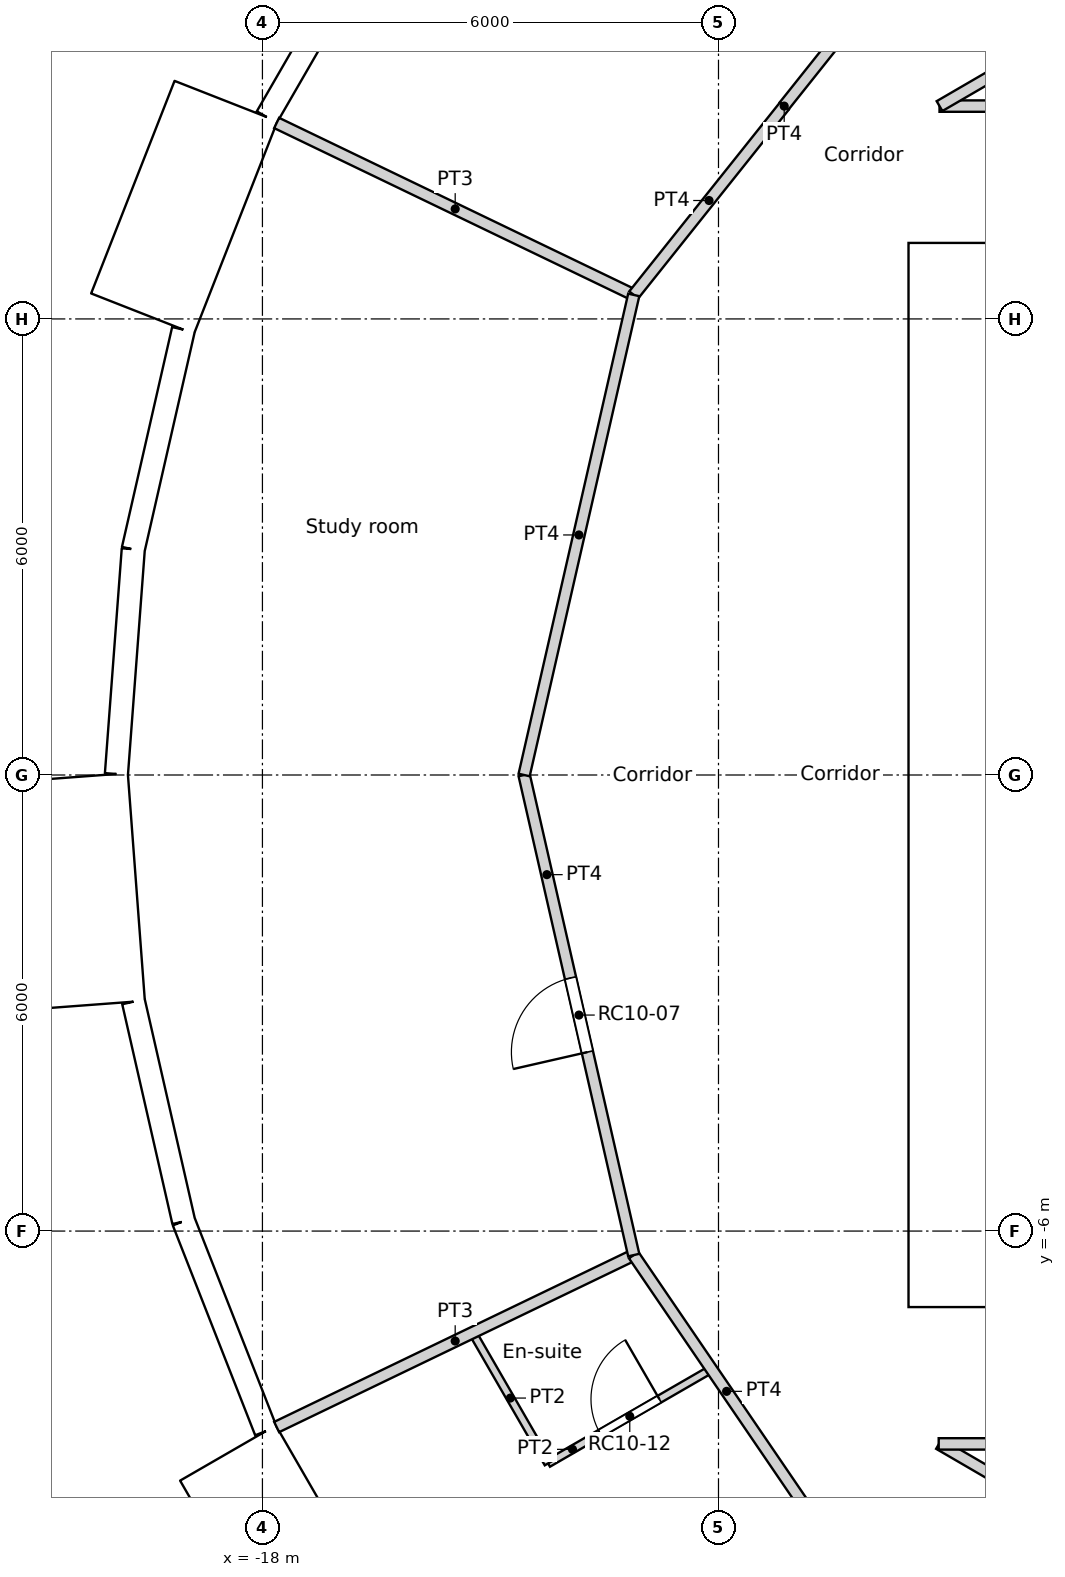
"""IFC4 building model, lengths in metres.
Left out: names, types, materials, properties, quantities, classifications, styles, units other than length and angle.
Written with IfcOpenShell. Run it as: python <this file> out.ifc"""

import sys

from ifc_helpers import new_model, si_unit, direction, frame, frame_2d, origin, origin_2d, place, context, subcontext, project, spatial, rectangle, circle, extrude, element, fill, save


model = new_model("IFC4")
c1 = context("Model", 3, precision=1e-05, world=origin(), true_north=direction((0.0, 1.0)))
c2 = subcontext(c1, "Body", "Model", "MODEL_VIEW")
j1 = project(units=[si_unit("LENGTHUNIT", "METRE"), si_unit("PLANEANGLEUNIT", "RADIAN")], contexts=[c1])
p1 = place(None, origin())
s1 = spatial("IfcSite", under=j1, at=p1, CompositionType="ELEMENT")
p2 = place(p1, origin())
s2 = spatial("IfcBuilding", under=s1, at=p2, CompositionType="ELEMENT")
p3 = place(p2, frame((0.0, 0.0, 323.4)))
s3 = spatial("IfcBuildingStorey", under=s2, at=p3, CompositionType="ELEMENT", Elevation=323.4)
for number, where, z_axis, x_axis in (
    (1, (-16.958, 8.167, 0.0), (0.0, 0.0, 1.0), (1.0, 0.0, 0.0)),
    (2, (-18.612, 2.805, 0.0), (0.0, 0.0, 1.0), (1.0, 0.0, 0.0)),
    (3, (-18.612, -2.805, 0.0), (0.0, 0.0, 1.0), (1.0, 0.0, 0.0)),
    (4, (-16.958, -8.167, 0.0), (0.0, 0.0, 1.0), (1.0, 0.0, 0.0)),
):
    element("IfcColumn", number, at=place(p3, frame(where, z_axis=z_axis, x_axis=x_axis)), inside=s3, PredefinedType="COLUMN", context=c2, shape_type="SweptSolid", body=[
        extrude(circle(Radius=0.45, at=origin_2d()), origin(), (0.0, 0.0, 1.0), 3.6),
    ])
p4 = place(p3, frame((-16.46, 11.222, 0.0), z_axis=(0.0, 0.0, 1.0), x_axis=(-0.499950756475, -0.86605383268, 0.0)))
e5 = element("IfcWall", 5, at=p4, inside=s3, PredefinedType="SOLIDWALL", context=c2, shape_type="SweptSolid", body=[
    extrude(rectangle(XDim=2.962, YDim=0.3, at=frame_2d((1.481, 0.0))), origin(), (0.0, 0.0, 1.0), 3.25),
])
p5 = place(p4, frame((1.481, 0.0, 1.55)))
e6 = element("IfcOpeningElement", 6, at=p5, cuts=e5, PredefinedType="OPENING", context=c2, shape_type="SweptSolid", body=[
    extrude(circle(Radius=0.9, at=origin_2d()), frame((0.0, 0.16, 0.0), z_axis=(0.0, -1.0, 0.0), x_axis=(1.0, 0.0, 0.0)), (0.0, 0.0, 1.0), 0.32),
])
p6 = place(p3, frame((-18.48, 8.864, -0.35), z_axis=(0.0, 0.0, 1.0), x_axis=(-0.36537792632, -0.93085926485, 0.0)))
e7 = element("IfcWall", 7, at=p6, inside=s3, PredefinedType="ELEMENTEDWALL", context=c2, shape_type="SweptSolid", body=[
    extrude(rectangle(XDim=3.0, YDim=1.45, at=frame_2d((1.5, 0.0))), origin(), (0.0, 0.0, 1.0), 3.6),
])
p7 = place(p6, frame((1.5, 0.0, 1.9)))
e8 = element("IfcOpeningElement", 8, at=p7, cuts=e7, PredefinedType="OPENING", context=c2, shape_type="SweptSolid", body=[
    extrude(circle(Radius=0.9, at=origin_2d()), frame((0.0, 0.735, 0.0), z_axis=(0.0, -1.0, 0.0), x_axis=(1.0, 0.0, 0.0)), (0.0, 0.0, 1.0), 1.47),
])
p8 = place(p3, frame((-19.04, 5.857, 0.0), z_axis=(0.0, 0.0, 1.0), x_axis=(-0.222529389789, -0.974925982155, 0.0)))
e9 = element("IfcWall", 9, at=p8, inside=s3, PredefinedType="SOLIDWALL", context=c2, shape_type="SweptSolid", body=[
    extrude(rectangle(XDim=2.962, YDim=0.3, at=frame_2d((1.481, 0.0))), origin(), (0.0, 0.0, 1.0), 3.25),
])
p9 = place(p8, frame((1.481, 0.0, 1.55)))
e10 = element("IfcOpeningElement", 10, at=p9, cuts=e9, PredefinedType="OPENING", context=c2, shape_type="SweptSolid", body=[
    extrude(circle(Radius=0.9, at=origin_2d()), frame((0.0, 0.16, 0.0), z_axis=(0.0, -1.0, 0.0), x_axis=(1.0, 0.0, 0.0)), (0.0, 0.0, 1.0), 0.32),
])
p10 = place(p3, frame((-19.699, 2.969, 0.0), z_axis=(0.0, 0.0, 1.0), x_axis=(-0.07474897196, -0.997202382263, 0.0)))
e11 = element("IfcWall", 11, at=p10, inside=s3, PredefinedType="SOLIDWALL", context=c2, shape_type="SweptSolid", body=[
    extrude(rectangle(XDim=2.962, YDim=0.3, at=frame_2d((1.481, 0.0))), origin(), (0.0, 0.0, 1.0), 3.25),
])
p11 = place(p10, frame((1.481, 0.0, 1.55)))
e12 = element("IfcOpeningElement", 12, at=p11, cuts=e11, PredefinedType="OPENING", context=c2, shape_type="SweptSolid", body=[
    extrude(circle(Radius=0.9, at=origin_2d()), frame((0.0, 0.16, 0.0), z_axis=(0.0, -1.0, 0.0), x_axis=(1.0, 0.0, 0.0)), (0.0, 0.0, 1.0), 0.32),
])
p12 = place(p3, frame((-20.496, -0.032, -0.35), z_axis=(0.0, 0.0, 1.0), x_axis=(0.074785902127, -0.997199613339, 0.0)))
e13 = element("IfcWall", 13, at=p12, inside=s3, PredefinedType="ELEMENTEDWALL", context=c2, shape_type="SweptSolid", body=[
    extrude(rectangle(XDim=3.0, YDim=1.45, at=frame_2d((1.5, 0.0))), origin(), (0.0, 0.0, 1.0), 3.6),
])
p13 = place(p12, frame((1.5, 0.0, 1.9)))
e14 = element("IfcOpeningElement", 14, at=p13, cuts=e13, PredefinedType="OPENING", context=c2, shape_type="SweptSolid", body=[
    extrude(circle(Radius=0.9, at=origin_2d()), frame((0.0, 0.735, 0.0), z_axis=(0.0, -1.0, 0.0), x_axis=(1.0, 0.0, 0.0)), (0.0, 0.0, 1.0), 1.47),
])
p14 = place(p3, frame((-19.696, -2.984, 0.0), z_axis=(0.0, 0.0, 1.0), x_axis=(0.222529389789, -0.974925982155, 0.0)))
e15 = element("IfcWall", 15, at=p14, inside=s3, PredefinedType="SOLIDWALL", context=c2, shape_type="SweptSolid", body=[
    extrude(rectangle(XDim=2.962, YDim=0.3, at=frame_2d((1.481, 0.0))), origin(), (0.0, 0.0, 1.0), 3.25),
])
p15 = place(p14, frame((1.481, 0.0, 1.55)))
e16 = element("IfcOpeningElement", 16, at=p15, cuts=e15, PredefinedType="OPENING", context=c2, shape_type="SweptSolid", body=[
    extrude(circle(Radius=0.9, at=origin_2d()), frame((0.0, 0.16, 0.0), z_axis=(0.0, -1.0, 0.0), x_axis=(1.0, 0.0, 0.0)), (0.0, 0.0, 1.0), 0.32),
])
p16 = place(p3, frame((-19.037, -5.872, 0.0), z_axis=(0.0, 0.0, 1.0), x_axis=(0.36530043032, -0.930889679612, 0.0)))
e17 = element("IfcWall", 17, at=p16, inside=s3, PredefinedType="SOLIDWALL", context=c2, shape_type="SweptSolid", body=[
    extrude(rectangle(XDim=2.962, YDim=0.3, at=frame_2d((1.481, 0.0))), origin(), (0.0, 0.0, 1.0), 3.25),
])
p17 = place(p16, frame((1.481, 0.0, 1.55)))
e18 = element("IfcOpeningElement", 18, at=p17, cuts=e17, PredefinedType="OPENING", context=c2, shape_type="SweptSolid", body=[
    extrude(circle(Radius=0.9, at=origin_2d()), frame((0.0, 0.16, 0.0), z_axis=(0.0, -1.0, 0.0), x_axis=(1.0, 0.0, 0.0)), (0.0, 0.0, 1.0), 0.32),
])
p18 = place(p3, frame((-18.452, -8.921, -0.35), z_axis=(0.0, 0.0, 1.0), x_axis=(0.499990139034, -0.866031096941, 0.0)))
e19 = element("IfcWall", 19, at=p18, inside=s3, PredefinedType="ELEMENTEDWALL", context=c2, shape_type="SweptSolid", body=[
    extrude(rectangle(XDim=3.0, YDim=1.45, at=frame_2d((1.5, 0.0))), origin(), (0.0, 0.0, 1.0), 3.6),
])
p19 = place(p18, frame((1.5, 0.0, 1.9)))
e20 = element("IfcOpeningElement", 20, at=p19, cuts=e19, PredefinedType="OPENING", context=c2, shape_type="SweptSolid", body=[
    extrude(circle(Radius=0.9, at=origin_2d()), frame((0.0, 0.735, 0.0), z_axis=(0.0, -1.0, 0.0), x_axis=(1.0, 0.0, 0.0)), (0.0, 0.0, 1.0), 1.47),
])
p20 = place(p3, frame((-9.5, -6.7, 0.0), z_axis=(0.0, 0.0, 1.0), x_axis=(1.0, 0.0, 0.0)))
e21 = element("IfcWall", 21, at=p20, inside=s3, PredefinedType="SOLIDWALL", context=c2, shape_type="SweptSolid", body=[
    extrude(rectangle(XDim=19.0, YDim=0.6, at=frame_2d((9.5, 0.0))), origin(), (0.0, 0.0, 1.0), 3.6),
])
p21 = place(p20, frame((10.4, 0.0, 0.0)))
e22 = element("IfcOpeningElement", 22, at=p21, cuts=e21, PredefinedType="OPENING", context=c2, shape_type="SweptSolid", body=[
    extrude(rectangle(XDim=1.0, YDim=2.1, at=frame_2d((0.5, 1.05))), frame((0.0, 0.3, 0.0), z_axis=(0.0, -1.0, 0.0), x_axis=(1.0, 0.0, 0.0)), (0.0, 0.0, 1.0), 0.6),
])
p22 = place(p20, frame((5.35, 0.0, 0.0)))
e23 = element("IfcOpeningElement", 23, at=p22, cuts=e21, PredefinedType="OPENING", context=c2, shape_type="SweptSolid", body=[
    extrude(rectangle(XDim=1.7, YDim=2.1, at=frame_2d((0.85, 1.05))), frame((0.0, 0.3, 0.0), z_axis=(0.0, -1.0, 0.0), x_axis=(1.0, 0.0, 0.0)), (0.0, 0.0, 1.0), 0.6),
])
p23 = place(p20, frame((11.95, 0.0, 0.0)))
e24 = element("IfcOpeningElement", 24, at=p23, cuts=e21, PredefinedType="OPENING", context=c2, shape_type="SweptSolid", body=[
    extrude(rectangle(XDim=1.7, YDim=2.1, at=frame_2d((0.85, 1.05))), frame((0.0, 0.3, 0.0), z_axis=(0.0, -1.0, 0.0), x_axis=(1.0, 0.0, 0.0)), (0.0, 0.0, 1.0), 0.6),
])
p24 = place(p3, frame((-9.5, 6.7, 0.0), z_axis=(0.0, 0.0, 1.0), x_axis=(1.0, 0.0, 0.0)))
e25 = element("IfcWall", 25, at=p24, inside=s3, PredefinedType="SOLIDWALL", context=c2, shape_type="SweptSolid", body=[
    extrude(rectangle(XDim=19.0, YDim=0.6, at=frame_2d((9.5, 0.0))), origin(), (0.0, 0.0, 1.0), 3.6),
])
p25 = place(p24, frame((5.35, 0.0, 0.0)))
e26 = element("IfcOpeningElement", 26, at=p25, cuts=e25, PredefinedType="OPENING", context=c2, shape_type="SweptSolid", body=[
    extrude(rectangle(XDim=1.7, YDim=2.1, at=frame_2d((0.85, 1.05))), frame((0.0, 0.3, 0.0), z_axis=(0.0, -1.0, 0.0), x_axis=(1.0, 0.0, 0.0)), (0.0, 0.0, 1.0), 0.6),
])
p26 = place(p3, frame((-9.2, -6.4, 0.0), z_axis=(0.0, 0.0, 1.0), x_axis=(0.0, 1.0, 0.0)))
e27 = element("IfcWall", 27, at=p26, inside=s3, PredefinedType="SOLIDWALL", context=c2, shape_type="SweptSolid", body=[
    extrude(rectangle(XDim=12.8, YDim=0.6, at=frame_2d((6.4, 0.0))), origin(), (0.0, 0.0, 1.0), 3.6),
])
p27 = place(p3, frame((-8.9, -3.1, 0.0), z_axis=(0.0, 0.0, 1.0), x_axis=(1.0, 0.0, 0.0)))
e28 = element("IfcWall", 28, at=p27, inside=s3, PredefinedType="SOLIDWALL", context=c2, shape_type="SweptSolid", body=[
    extrude(rectangle(XDim=9.6, YDim=0.3, at=frame_2d((4.8, 0.0))), origin(), (0.0, 0.0, 1.0), 3.25),
])
p28 = place(p27, frame((4.75, 0.0, 0.0)))
e29 = element("IfcOpeningElement", 29, at=p28, cuts=e28, PredefinedType="OPENING", context=c2, shape_type="SweptSolid", body=[
    extrude(rectangle(XDim=1.7, YDim=2.1, at=frame_2d((0.85, 1.05))), frame((0.0, 0.15, 0.0), z_axis=(0.0, -1.0, 0.0), x_axis=(1.0, 0.0, 0.0)), (0.0, 0.0, 1.0), 0.3),
])
p29 = place(p3, frame((-8.9, 3.1, 0.0), z_axis=(0.0, 0.0, 1.0), x_axis=(1.0, 0.0, 0.0)))
e30 = element("IfcWall", 30, at=p29, inside=s3, PredefinedType="SOLIDWALL", context=c2, shape_type="SweptSolid", body=[
    extrude(rectangle(XDim=4.55, YDim=0.3, at=frame_2d((2.275, 0.0))), origin(), (0.0, 0.0, 1.0), 3.25),
])
p30 = place(p3, frame((-8.9, 0.0, 0.0), z_axis=(0.0, 0.0, 1.0), x_axis=(1.0, 0.0, 0.0)))
e31 = element("IfcWall", 31, at=p30, inside=s3, PredefinedType="SOLIDWALL", context=c2, shape_type="SweptSolid", body=[
    extrude(rectangle(XDim=3.0, YDim=0.3, at=frame_2d((1.5, 0.0))), origin(), (0.0, 0.0, 1.0), 3.25),
])
p31 = place(p3, frame((-9.092, 8.8, 0.0), z_axis=(0.0, 0.0, 1.0), x_axis=(0.864470922103, 0.502682827277, 0.0)))
e32 = element("IfcWall", 32, at=p31, inside=s3, PredefinedType="PARTITIONING", context=c2, shape_type="SweptSolid", body=[
    extrude(rectangle(XDim=6.735, YDim=0.15, at=frame_2d((3.368, 0.0))), origin(), (0.0, 0.0, 1.0), 3.25),
])
p32 = place(p3, frame((-9.092, 8.8, 0.0), z_axis=(0.0, 0.0, 1.0), x_axis=(1.0, 0.0, 0.0)))
e33 = element("IfcWall", 33, at=p32, inside=s3, PredefinedType="PARTITIONING", context=c2, shape_type="SweptSolid", body=[
    extrude(rectangle(XDim=7.286, YDim=0.15, at=frame_2d((3.643, 0.0))), origin(), (0.0, 0.0, 1.0), 3.25),
])
p33 = place(p32, frame((3.143, 0.0, 0.0)))
e34 = element("IfcOpeningElement", 34, at=p33, cuts=e33, PredefinedType="OPENING", context=c2, shape_type="SweptSolid", body=[
    extrude(rectangle(XDim=1.0, YDim=2.04, at=frame_2d((0.5, 1.02))), frame((0.0, 0.075, 0.0), z_axis=(0.0, -1.0, 0.0), x_axis=(1.0, 0.0, 0.0)), (0.0, 0.0, 1.0), 0.15),
])
p34 = place(p3, frame((-11.134, 8.8, 0.0), z_axis=(0.0, 0.0, 1.0), x_axis=(-1.0, 0.0, 0.0)))
e35 = element("IfcWall", 35, at=p34, inside=s3, PredefinedType="PARTITIONING", context=c2, shape_type="SweptSolid", body=[
    extrude(rectangle(XDim=0.003, YDim=0.15, at=frame_2d((0.001, 0.0))), origin(), (0.0, 0.0, 1.0), 3.25),
])
p35 = place(p3, frame((-11.136, 8.802, 0.0), z_axis=(0.0, 0.0, 1.0), x_axis=(0.623151397235, 0.782101231379, 0.0)))
e36 = element("IfcWall", 36, at=p35, inside=s3, PredefinedType="PARTITIONING", context=c2, shape_type="SweptSolid", body=[
    extrude(rectangle(XDim=3.301, YDim=0.15, at=frame_2d((1.65, 0.0))), origin(), (0.0, 0.0, 1.0), 3.25),
])
p36 = place(p3, frame((-9.103, -8.8, 0.0), z_axis=(0.0, 0.0, 1.0), x_axis=(1.0, 0.0, 0.0)))
e37 = element("IfcWall", 37, at=p36, inside=s3, PredefinedType="PARTITIONING", context=c2, shape_type="SweptSolid", body=[
    extrude(rectangle(XDim=18.204, YDim=0.15, at=frame_2d((9.102, 0.0))), origin(), (0.0, 0.0, 1.0), 3.25),
])
p37 = place(p36, frame((8.597, 0.0, 0.0)))
e38 = element("IfcOpeningElement", 38, at=p37, cuts=e37, PredefinedType="OPENING", context=c2, shape_type="SweptSolid", body=[
    extrude(rectangle(XDim=1.0, YDim=2.04, at=frame_2d((0.5, 1.02))), frame((0.0, 0.075, 0.0), z_axis=(0.0, -1.0, 0.0), x_axis=(1.0, 0.0, 0.0)), (0.0, 0.0, 1.0), 0.15),
])
p38 = place(p3, frame((-9.099, -8.8, 0.0), z_axis=(0.0, 0.0, 1.0), x_axis=(0.864286794128, -0.502999341447, 0.0)))
e39 = element("IfcWall", 39, at=p38, inside=s3, PredefinedType="PARTITIONING", context=c2, shape_type="SweptSolid", body=[
    extrude(rectangle(XDim=6.741, YDim=0.15, at=frame_2d((3.371, 0.0))), origin(), (0.0, 0.0, 1.0), 3.25),
])
p39 = place(p3, frame((-13.115, 6.316, 0.0), z_axis=(0.0, 0.0, 1.0), x_axis=(0.623476099415, 0.781842409606, 0.0)))
e40 = element("IfcWall", 40, at=p39, inside=s3, PredefinedType="PARTITIONING", context=c2, shape_type="SweptSolid", body=[
    extrude(rectangle(XDim=3.177, YDim=0.15, at=frame_2d((1.589, 0.0))), origin(), (0.0, 0.0, 1.0), 3.25),
])
p40 = place(p3, frame((-14.557, 0.0, 0.0), z_axis=(0.0, 0.0, 1.0), x_axis=(0.222568978642, -0.97491694505, 0.0)))
e41 = element("IfcWall", 41, at=p40, inside=s3, PredefinedType="PARTITIONING", context=c2, shape_type="SweptSolid", body=[
    extrude(rectangle(XDim=6.479, YDim=0.15, at=frame_2d((3.239, 0.0))), origin(), (0.0, 0.0, 1.0), 3.25),
])
p41 = place(p40, frame((2.74, 0.0, 0.0)))
e42 = element("IfcOpeningElement", 42, at=p41, cuts=e41, PredefinedType="OPENING", context=c2, shape_type="SweptSolid", body=[
    extrude(rectangle(XDim=1.0, YDim=2.04, at=frame_2d((0.5, 1.02))), frame((0.0, 0.075, 0.0), z_axis=(0.0, -1.0, 0.0), x_axis=(1.0, 0.0, 0.0)), (0.0, 0.0, 1.0), 0.15),
])
p42 = place(p3, frame((-14.557, 0.0, 0.0), z_axis=(0.0, 0.0, 1.0), x_axis=(0.222568978642, 0.97491694505, 0.0)))
e43 = element("IfcWall", 43, at=p42, inside=s3, PredefinedType="PARTITIONING", context=c2, shape_type="SweptSolid", body=[
    extrude(rectangle(XDim=6.479, YDim=0.15, at=frame_2d((3.239, 0.0))), origin(), (0.0, 0.0, 1.0), 3.25),
])
p43 = place(p3, frame((-13.115, -6.316, 0.0), z_axis=(0.0, 0.0, 1.0), x_axis=(0.563434599286, -0.826160669802, 0.0)))
e44 = element("IfcWall", 44, at=p43, inside=s3, PredefinedType="PARTITIONING", context=c2, shape_type="SweptSolid", body=[
    extrude(rectangle(XDim=4.339, YDim=0.15, at=frame_2d((2.169, 0.0))), origin(), (0.0, 0.0, 1.0), 3.25),
])
for number, where, z_axis, x_axis in (
    (45, (-17.813, 8.578, 0.0), (0.0, 0.0, 1.0), (0.901, -0.434, 0.0)),
    (46, (-17.813, -8.578, 0.0), (0.0, 0.0, 1.0), (0.901, 0.434, 0.0)),
):
    element("IfcWall", number, at=place(p3, frame(where, z_axis=z_axis, x_axis=x_axis)), inside=s3, PredefinedType="PARTITIONING", context=c2, shape_type="SweptSolid", body=[
        extrude(rectangle(XDim=5.214, YDim=0.15, at=frame_2d((2.607, 0.0))), origin(), (0.0, 0.0, 1.0), 3.25),
    ])
p44 = place(p3, frame((-15.235, -7.337, 0.0), z_axis=(0.0, 0.0, 1.0), x_axis=(0.50005230485, -0.865995203459, 0.0)))
e47 = element("IfcWall", 47, at=p44, inside=s3, PredefinedType="PARTITIONING", context=c2, shape_type="SweptSolid", body=[
    extrude(rectangle(XDim=1.986, YDim=0.1, at=frame_2d((0.993, 0.0))), origin(), (0.0, 0.0, 1.0), 3.25),
])
p45 = place(p3, frame((-14.242, -9.057, 0.0), z_axis=(0.0, 0.0, 1.0), x_axis=(0.865975856927, 0.500085807857, 0.0)))
e48 = element("IfcWall", 48, at=p45, inside=s3, PredefinedType="PARTITIONING", context=c2, shape_type="SweptSolid", body=[
    extrude(rectangle(XDim=2.481, YDim=0.1, at=frame_2d((1.241, 0.0))), origin(), (0.0, 0.0, 1.0), 3.25),
])
p46 = place(p45, frame((0.791, 0.0, 0.0)))
e49 = element("IfcOpeningElement", 49, at=p46, cuts=e48, PredefinedType="OPENING", context=c2, shape_type="SweptSolid", body=[
    extrude(rectangle(XDim=0.9, YDim=2.04, at=frame_2d((0.45, 1.02))), frame((0.0, 0.05, 0.0), z_axis=(0.0, -1.0, 0.0), x_axis=(1.0, 0.0, 0.0)), (0.0, 0.0, 1.0), 0.1),
])
p47 = place(p5, origin())
e50 = element("IfcWindow", 50, at=p47, inside=s3, PartitioningType="SINGLE_PANEL", PredefinedType="WINDOW", context=c2, shape_type="SweptSolid", body=[
    extrude(circle(Radius=0.9, at=origin_2d()), frame((0.0, 0.12, 0.0), z_axis=(0.0, -1.0, 0.0), x_axis=(1.0, 0.0, 0.0)), (0.0, 0.0, 1.0), 0.1),
])
fill(e6, e50)
p48 = place(p7, origin())
e51 = element("IfcWindow", 51, at=p48, inside=s3, PartitioningType="SINGLE_PANEL", PredefinedType="WINDOW", context=c2, shape_type="SweptSolid", body=[
    extrude(circle(Radius=0.9, at=origin_2d()), frame((0.0, 0.695, 0.0), z_axis=(0.0, -1.0, 0.0), x_axis=(1.0, 0.0, 0.0)), (0.0, 0.0, 1.0), 0.1),
])
fill(e8, e51)
p49 = place(p9, origin())
e52 = element("IfcWindow", 52, at=p49, inside=s3, PartitioningType="SINGLE_PANEL", PredefinedType="WINDOW", context=c2, shape_type="SweptSolid", body=[
    extrude(circle(Radius=0.9, at=origin_2d()), frame((0.0, 0.12, 0.0), z_axis=(0.0, -1.0, 0.0), x_axis=(1.0, 0.0, 0.0)), (0.0, 0.0, 1.0), 0.1),
])
fill(e10, e52)
p50 = place(p11, origin())
e53 = element("IfcWindow", 53, at=p50, inside=s3, PartitioningType="SINGLE_PANEL", PredefinedType="WINDOW", context=c2, shape_type="SweptSolid", body=[
    extrude(circle(Radius=0.9, at=origin_2d()), frame((0.0, 0.12, 0.0), z_axis=(0.0, -1.0, 0.0), x_axis=(1.0, 0.0, 0.0)), (0.0, 0.0, 1.0), 0.1),
])
fill(e12, e53)
p51 = place(p13, origin())
e54 = element("IfcWindow", 54, at=p51, inside=s3, PartitioningType="SINGLE_PANEL", PredefinedType="WINDOW", context=c2, shape_type="SweptSolid", body=[
    extrude(circle(Radius=0.9, at=origin_2d()), frame((0.0, 0.695, 0.0), z_axis=(0.0, -1.0, 0.0), x_axis=(1.0, 0.0, 0.0)), (0.0, 0.0, 1.0), 0.1),
])
fill(e14, e54)
p52 = place(p15, origin())
e55 = element("IfcWindow", 55, at=p52, inside=s3, PartitioningType="SINGLE_PANEL", PredefinedType="WINDOW", context=c2, shape_type="SweptSolid", body=[
    extrude(circle(Radius=0.9, at=origin_2d()), frame((0.0, 0.12, 0.0), z_axis=(0.0, -1.0, 0.0), x_axis=(1.0, 0.0, 0.0)), (0.0, 0.0, 1.0), 0.1),
])
fill(e16, e55)
p53 = place(p17, origin())
e56 = element("IfcWindow", 56, at=p53, inside=s3, PartitioningType="SINGLE_PANEL", PredefinedType="WINDOW", context=c2, shape_type="SweptSolid", body=[
    extrude(circle(Radius=0.9, at=origin_2d()), frame((0.0, 0.12, 0.0), z_axis=(0.0, -1.0, 0.0), x_axis=(1.0, 0.0, 0.0)), (0.0, 0.0, 1.0), 0.1),
])
fill(e18, e56)
p54 = place(p19, origin())
e57 = element("IfcWindow", 57, at=p54, inside=s3, PartitioningType="SINGLE_PANEL", PredefinedType="WINDOW", context=c2, shape_type="SweptSolid", body=[
    extrude(circle(Radius=0.9, at=origin_2d()), frame((0.0, 0.695, 0.0), z_axis=(0.0, -1.0, 0.0), x_axis=(1.0, 0.0, 0.0)), (0.0, 0.0, 1.0), 0.1),
])
fill(e20, e57)
p55 = place(p41, origin())
e58 = element("IfcDoor", 58, at=p55, inside=s3, OperationType="SINGLE_SWING_LEFT", PredefinedType="DOOR", context=c2, shape_type="SweptSolid", body=[
    extrude(rectangle(XDim=1.0, YDim=2.04, at=frame_2d((0.5, 1.02))), frame((0.0, 0.025, 0.0), z_axis=(0.0, -1.0, 0.0), x_axis=(1.0, 0.0, 0.0)), (0.0, 0.0, 1.0), 0.05),
])
fill(e42, e58)
p56 = place(p46, origin())
e59 = element("IfcDoor", 59, at=p56, inside=s3, OperationType="SINGLE_SWING_RIGHT", PredefinedType="DOOR", context=c2, shape_type="SweptSolid", body=[
    extrude(rectangle(XDim=0.9, YDim=2.04, at=frame_2d((0.45, 1.02))), frame((0.0, 0.025, 0.0), z_axis=(0.0, -1.0, 0.0), x_axis=(1.0, 0.0, 0.0)), (0.0, 0.0, 1.0), 0.05),
])
fill(e49, e59)
save(model, sys.argv[1])
